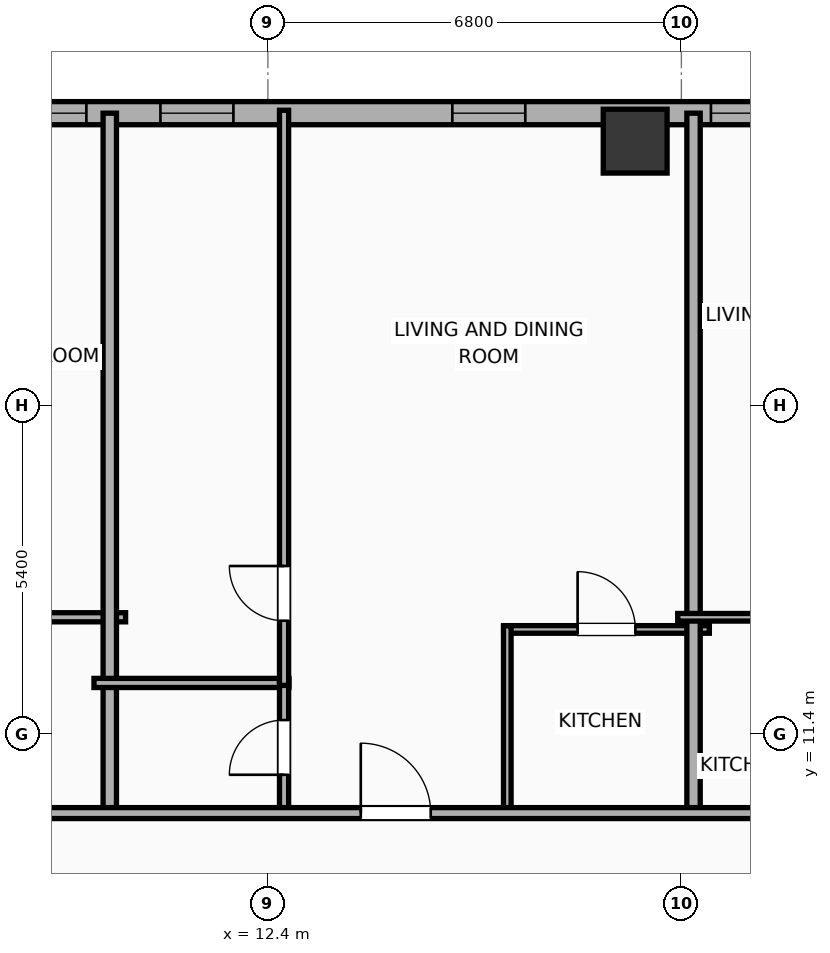
"""IFC4 building model, lengths in metres.
Left out: names, types, materials, properties, quantities, classifications, styles, units other than length and angle.
Written with IfcOpenShell. Run it as: python <this file> out.ifc"""

import sys

from ifc_helpers import new_model, si_unit, direction, frame, frame_2d, origin, origin_2d, place, context, subcontext, project, spatial, rectangle, hollow_rectangle, extrude, element, fill, save


model = new_model("IFC4")
c1 = context("Model", 3, precision=1e-05, world=origin(), true_north=direction((0.0, 1.0)))
c2 = subcontext(c1, "Body", "Model", "MODEL_VIEW")
j1 = project(units=[si_unit("LENGTHUNIT", "METRE"), si_unit("PLANEANGLEUNIT", "RADIAN")], contexts=[c1])
p1 = place(None, origin())
s1 = spatial("IfcSite", under=j1, at=p1, CompositionType="ELEMENT")
p2 = place(p1, origin())
s2 = spatial("IfcBuilding", under=s1, at=p2, CompositionType="ELEMENT")
p3 = place(p2, frame((0.0, 0.0, 105.3)))
s3 = spatial("IfcBuildingStorey", under=s2, at=p3, CompositionType="ELEMENT", Elevation=105.3)
p4 = place(p3, frame((18.44, 21.15, 0.0), z_axis=(0.0, 0.0, 1.0), x_axis=(1.0, 0.0, 0.0)))
e1 = element("IfcColumn", 1, at=p4, inside=s3, PredefinedType="COLUMN", context=c2, shape_type="SweptSolid", body=[
    extrude(hollow_rectangle(XDim=1.05, YDim=1.05, WallThickness=0.036, at=origin_2d()), origin(), (0.0, 0.0, 1.0), 3.9),
])
p5 = place(p3, frame((-25.381, 21.61, 0.0), z_axis=(0.0, 0.0, 1.0), x_axis=(1.0, 0.0, 0.0)))
e2 = element("IfcWall", 2, at=p5, inside=s3, PredefinedType="ELEMENTEDWALL", context=c2, shape_type="SweptSolid", body=[
    extrude(rectangle(XDim=54.763, YDim=0.38, at=frame_2d((27.381, 0.0))), origin(), (0.0, 0.0, 1.0), 3.65),
])
p6 = place(p5, frame((45.067, 0.0, 0.75)))
e3 = element("IfcOpeningElement", 3, at=p6, cuts=e2, PredefinedType="OPENING", context=c2, shape_type="SweptSolid", body=[
    extrude(rectangle(XDim=2.4, YDim=2.1, at=frame_2d((1.2, 1.05))), frame((0.0, 0.2, 0.0), z_axis=(0.0, -1.0, 0.0), x_axis=(1.0, 0.0, 0.0)), (0.0, 0.0, 1.0), 0.4),
])
p7 = place(p5, frame((4.076, 0.0, 0.75)))
e4 = element("IfcOpeningElement", 4, at=p7, cuts=e2, PredefinedType="OPENING", context=c2, shape_type="SweptSolid", body=[
    extrude(rectangle(XDim=1.2, YDim=2.05, at=frame_2d((0.6, 1.025))), frame((0.0, 0.2, 0.0), z_axis=(0.0, -1.0, 0.0), x_axis=(1.0, 0.0, 0.0)), (0.0, 0.0, 1.0), 0.4),
])
p8 = place(p5, frame((9.395, 0.0, 0.75)))
e5 = element("IfcOpeningElement", 5, at=p8, cuts=e2, PredefinedType="OPENING", context=c2, shape_type="SweptSolid", body=[
    extrude(rectangle(XDim=0.85, YDim=2.05, at=frame_2d((0.425, 1.025))), frame((0.0, 0.2, 0.0), z_axis=(0.0, -1.0, 0.0), x_axis=(1.0, 0.0, 0.0)), (0.0, 0.0, 1.0), 0.4),
])
p9 = place(p5, frame((7.205, 0.0, 0.75)))
e6 = element("IfcOpeningElement", 6, at=p9, cuts=e2, PredefinedType="OPENING", context=c2, shape_type="SweptSolid", body=[
    extrude(rectangle(XDim=1.2, YDim=2.05, at=frame_2d((0.6, 1.025))), frame((0.0, 0.2, 0.0), z_axis=(0.0, -1.0, 0.0), x_axis=(1.0, 0.0, 0.0)), (0.0, 0.0, 1.0), 0.4),
])
p10 = place(p5, frame((13.676, 0.0, 0.75)))
e7 = element("IfcOpeningElement", 7, at=p10, cuts=e2, PredefinedType="OPENING", context=c2, shape_type="SweptSolid", body=[
    extrude(rectangle(XDim=1.2, YDim=2.05, at=frame_2d((0.6, 1.025))), frame((0.0, 0.2, 0.0), z_axis=(0.0, -1.0, 0.0), x_axis=(1.0, 0.0, 0.0)), (0.0, 0.0, 1.0), 0.4),
])
p11 = place(p5, frame((17.136, 0.0, 0.75)))
e8 = element("IfcOpeningElement", 8, at=p11, cuts=e2, PredefinedType="OPENING", context=c2, shape_type="SweptSolid", body=[
    extrude(rectangle(XDim=1.2, YDim=2.05, at=frame_2d((0.6, 1.025))), frame((0.0, 0.2, 0.0), z_axis=(0.0, -1.0, 0.0), x_axis=(1.0, 0.0, 0.0)), (0.0, 0.0, 1.0), 0.4),
])
p12 = place(p5, frame((22.656, 0.0, 0.75)))
e9 = element("IfcOpeningElement", 9, at=p12, cuts=e2, PredefinedType="OPENING", context=c2, shape_type="SweptSolid", body=[
    extrude(rectangle(XDim=1.2, YDim=2.05, at=frame_2d((0.6, 1.025))), frame((0.0, 0.2, 0.0), z_axis=(0.0, -1.0, 0.0), x_axis=(1.0, 0.0, 0.0)), (0.0, 0.0, 1.0), 0.4),
])
p13 = place(p5, frame((29.443, 0.0, 0.75)))
e10 = element("IfcOpeningElement", 10, at=p13, cuts=e2, PredefinedType="OPENING", context=c2, shape_type="SweptSolid", body=[
    extrude(rectangle(XDim=1.2, YDim=2.05, at=frame_2d((0.6, 1.025))), frame((0.0, 0.2, 0.0), z_axis=(0.0, -1.0, 0.0), x_axis=(1.0, 0.0, 0.0)), (0.0, 0.0, 1.0), 0.4),
])
p14 = place(p5, frame((26.348, 0.0, 0.75)))
e11 = element("IfcOpeningElement", 11, at=p14, cuts=e2, PredefinedType="OPENING", context=c2, shape_type="SweptSolid", body=[
    extrude(rectangle(XDim=1.2, YDim=2.05, at=frame_2d((0.6, 1.025))), frame((0.0, 0.2, 0.0), z_axis=(0.0, -1.0, 0.0), x_axis=(1.0, 0.0, 0.0)), (0.0, 0.0, 1.0), 0.4),
])
p15 = place(p5, frame((33.596, 0.0, 0.75)))
e12 = element("IfcOpeningElement", 12, at=p15, cuts=e2, PredefinedType="OPENING", context=c2, shape_type="SweptSolid", body=[
    extrude(rectangle(XDim=1.2, YDim=2.05, at=frame_2d((0.6, 1.025))), frame((0.0, 0.2, 0.0), z_axis=(0.0, -1.0, 0.0), x_axis=(1.0, 0.0, 0.0)), (0.0, 0.0, 1.0), 0.4),
])
p16 = place(p5, frame((36.014, 0.0, 0.75)))
e13 = element("IfcOpeningElement", 13, at=p16, cuts=e2, PredefinedType="OPENING", context=c2, shape_type="SweptSolid", body=[
    extrude(rectangle(XDim=1.2, YDim=2.05, at=frame_2d((0.6, 1.025))), frame((0.0, 0.2, 0.0), z_axis=(0.0, -1.0, 0.0), x_axis=(1.0, 0.0, 0.0)), (0.0, 0.0, 1.0), 0.4),
])
p17 = place(p5, frame((40.814, 0.0, 0.75)))
e14 = element("IfcOpeningElement", 14, at=p17, cuts=e2, PredefinedType="OPENING", context=c2, shape_type="SweptSolid", body=[
    extrude(rectangle(XDim=1.2, YDim=2.05, at=frame_2d((0.6, 1.025))), frame((0.0, 0.2, 0.0), z_axis=(0.0, -1.0, 0.0), x_axis=(1.0, 0.0, 0.0)), (0.0, 0.0, 1.0), 0.4),
])
p18 = place(p5, frame((49.385, 0.0, 0.75)))
e15 = element("IfcOpeningElement", 15, at=p18, cuts=e2, PredefinedType="OPENING", context=c2, shape_type="SweptSolid", body=[
    extrude(rectangle(XDim=1.2, YDim=2.05, at=frame_2d((0.6, 1.025))), frame((0.0, 0.2, 0.0), z_axis=(0.0, -1.0, 0.0), x_axis=(1.0, 0.0, 0.0)), (0.0, 0.0, 1.0), 0.4),
])
p19 = place(p5, frame((52.181, 0.0, 0.75)))
e16 = element("IfcOpeningElement", 16, at=p19, cuts=e2, PredefinedType="OPENING", context=c2, shape_type="SweptSolid", body=[
    extrude(rectangle(XDim=1.2, YDim=2.05, at=frame_2d((0.6, 1.025))), frame((0.0, 0.2, 0.0), z_axis=(0.0, -1.0, 0.0), x_axis=(1.0, 0.0, 0.0)), (0.0, 0.0, 1.0), 0.4),
])
p20 = place(p3, frame((6.27, 13.32, 0.0), z_axis=(0.0, 0.0, 1.0), x_axis=(1.0, 0.0, 0.0)))
e17 = element("IfcWall", 17, at=p20, inside=s3, PredefinedType="PLUMBINGWALL", context=c2, shape_type="SweptSolid", body=[
    extrude(rectangle(XDim=3.79, YDim=0.15, at=frame_2d((1.895, 0.0))), origin(), (0.0, 0.0, 1.0), 3.65),
])
p21 = place(p3, frame((9.8, 10.02, 0.0), z_axis=(0.0, 0.0, 1.0), x_axis=(0.0, 1.0, 0.0)))
e18 = element("IfcWall", 18, at=p21, inside=s3, PredefinedType="PARTITIONING", context=c2, shape_type="SweptSolid", body=[
    extrude(rectangle(XDim=11.59, YDim=0.22, at=frame_2d((5.795, 0.0))), origin(), (0.0, 0.0, 1.0), 3.65),
])
p22 = place(p3, frame((9.54, 12.24, 0.0), z_axis=(0.0, 0.0, 1.0), x_axis=(1.0, 0.0, 0.0)))
e19 = element("IfcWall", 19, at=p22, inside=s3, PredefinedType="PLUMBINGWALL", context=c2, shape_type="SweptSolid", body=[
    extrude(rectangle(XDim=3.206, YDim=0.15, at=frame_2d((1.603, 0.0))), origin(), (0.0, 0.0, 1.0), 3.65),
])
p23 = place(p3, frame((12.666, 10.08, 0.0), z_axis=(0.0, 0.0, 1.0), x_axis=(0.0, 1.0, 0.0)))
e20 = element("IfcWall", 20, at=p23, inside=s3, PredefinedType="PLUMBINGWALL", context=c2, shape_type="SweptSolid", body=[
    extrude(rectangle(XDim=2.2, YDim=0.15, at=frame_2d((1.1, 0.0))), origin(), (0.0, 0.0, 1.0), 3.65),
])
p24 = place(p23, frame((0.65, 0.0, 0.0)))
e21 = element("IfcOpeningElement", 21, at=p24, cuts=e20, PredefinedType="OPENING", context=c2, shape_type="SweptSolid", body=[
    extrude(rectangle(XDim=0.9, YDim=2.05, at=frame_2d((0.45, 1.025))), frame((0.0, 0.085, 0.0), z_axis=(0.0, -1.0, 0.0), x_axis=(1.0, 0.0, 0.0)), (0.0, 0.0, 1.0), 0.17),
])
p25 = place(p3, frame((12.666, 12.2, 0.0), z_axis=(0.0, 0.0, 1.0), x_axis=(0.0, 1.0, 0.0)))
e22 = element("IfcWall", 22, at=p25, inside=s3, PredefinedType="PLUMBINGWALL", context=c2, shape_type="SweptSolid", body=[
    extrude(rectangle(XDim=9.458, YDim=0.15, at=frame_2d((4.729, 0.0))), origin(), (0.0, 0.0, 1.0), 3.65),
])
p26 = place(p25, frame((1.063, 0.0, 0.0)))
e23 = element("IfcOpeningElement", 23, at=p26, cuts=e22, PredefinedType="OPENING", context=c2, shape_type="SweptSolid", body=[
    extrude(rectangle(XDim=0.9, YDim=2.05, at=frame_2d((0.45, 1.025))), frame((0.0, 0.085, 0.0), z_axis=(0.0, -1.0, 0.0), x_axis=(1.0, 0.0, 0.0)), (0.0, 0.0, 1.0), 0.17),
])
p27 = place(p3, frame((16.277, 13.12, 0.0), z_axis=(0.0, 0.0, 1.0), x_axis=(1.0, 0.0, 0.0)))
e24 = element("IfcWall", 24, at=p27, inside=s3, PredefinedType="PARTITIONING", context=c2, shape_type="SweptSolid", body=[
    extrude(rectangle(XDim=3.383, YDim=0.125, at=frame_2d((1.691, 0.0))), origin(), (0.0, 0.0, 1.0), 3.65),
])
p28 = place(p27, frame((1.217, 0.0, 0.0)))
e25 = element("IfcOpeningElement", 25, at=p28, cuts=e24, PredefinedType="OPENING", context=c2, shape_type="SweptSolid", body=[
    extrude(rectangle(XDim=0.95, YDim=2.05, at=frame_2d((0.475, 1.025))), frame((0.0, 0.073, 0.0), z_axis=(0.0, -1.0, 0.0), x_axis=(1.0, 0.0, 0.0)), (0.0, 0.0, 1.0), 0.145),
])
p29 = place(p3, frame((16.337, 10.08, 0.0), z_axis=(0.0, 0.0, 1.0), x_axis=(0.0, 1.0, 0.0)))
e26 = element("IfcWall", 26, at=p29, inside=s3, PredefinedType="PARTITIONING", context=c2, shape_type="SweptSolid", body=[
    extrude(rectangle(XDim=3.1, YDim=0.125, at=frame_2d((1.55, 0.0))), origin(), (0.0, 0.0, 1.0), 3.65),
])
p30 = place(p3, frame((19.4, 10.02, 0.0), z_axis=(0.0, 0.0, 1.0), x_axis=(0.0, 1.0, 0.0)))
e27 = element("IfcWall", 27, at=p30, inside=s3, PredefinedType="PARTITIONING", context=c2, shape_type="SweptSolid", body=[
    extrude(rectangle(XDim=11.59, YDim=0.22, at=frame_2d((5.795, 0.0))), origin(), (0.0, 0.0, 1.0), 3.65),
])
p31 = place(p3, frame((19.14, 13.32, 0.0), z_axis=(0.0, 0.0, 1.0), x_axis=(1.0, 0.0, 0.0)))
e28 = element("IfcWall", 28, at=p31, inside=s3, PredefinedType="PARTITIONING", context=c2, shape_type="SweptSolid", body=[
    extrude(rectangle(XDim=2.69, YDim=0.125, at=frame_2d((1.345, 0.0))), origin(), (0.0, 0.0, 1.0), 3.65),
])
p32 = place(p3, frame((-29.21, 10.1, 0.0), z_axis=(0.0, 0.0, 1.0), x_axis=(1.0, 0.0, 0.0)))
e29 = element("IfcWall", 29, at=p32, inside=s3, PredefinedType="PARTITIONING", context=c2, shape_type="SweptSolid", body=[
    extrude(rectangle(XDim=62.42, YDim=0.18, at=frame_2d((31.21, 0.0))), origin(), (0.0, 0.0, 1.0), 3.65),
])
p33 = place(p32, frame((4.906, 0.0, 0.0)))
e30 = element("IfcOpeningElement", 30, at=p33, cuts=e29, PredefinedType="OPENING", context=c2, shape_type="SweptSolid", body=[
    extrude(rectangle(XDim=1.15, YDim=2.05, at=frame_2d((0.575, 1.025))), frame((0.0, 0.1, 0.0), z_axis=(0.0, -1.0, 0.0), x_axis=(1.0, 0.0, 0.0)), (0.0, 0.0, 1.0), 0.2),
])
p34 = place(p32, frame((14.812, 0.0, 0.0)))
e31 = element("IfcOpeningElement", 31, at=p34, cuts=e29, PredefinedType="OPENING", context=c2, shape_type="SweptSolid", body=[
    extrude(rectangle(XDim=1.15, YDim=2.05, at=frame_2d((0.575, 1.025))), frame((0.0, 0.1, 0.0), z_axis=(0.0, -1.0, 0.0), x_axis=(1.0, 0.0, 0.0)), (0.0, 0.0, 1.0), 0.2),
])
p35 = place(p32, frame((24.406, 0.0, 0.0)))
e32 = element("IfcOpeningElement", 32, at=p35, cuts=e29, PredefinedType="OPENING", context=c2, shape_type="SweptSolid", body=[
    extrude(rectangle(XDim=1.15, YDim=2.05, at=frame_2d((0.575, 1.025))), frame((0.0, 0.1, 0.0), z_axis=(0.0, -1.0, 0.0), x_axis=(1.0, 0.0, 0.0)), (0.0, 0.0, 1.0), 0.2),
])
p36 = place(p32, frame((33.981, 0.0, 0.0)))
e33 = element("IfcOpeningElement", 33, at=p36, cuts=e29, PredefinedType="OPENING", context=c2, shape_type="SweptSolid", body=[
    extrude(rectangle(XDim=1.15, YDim=2.05, at=frame_2d((0.575, 1.025))), frame((0.0, 0.1, 0.0), z_axis=(0.0, -1.0, 0.0), x_axis=(1.0, 0.0, 0.0)), (0.0, 0.0, 1.0), 0.2),
])
p37 = place(p32, frame((43.138, 0.0, 0.0)))
e34 = element("IfcOpeningElement", 34, at=p37, cuts=e29, PredefinedType="OPENING", context=c2, shape_type="SweptSolid", body=[
    extrude(rectangle(XDim=1.15, YDim=2.05, at=frame_2d((0.575, 1.025))), frame((0.0, 0.1, 0.0), z_axis=(0.0, -1.0, 0.0), x_axis=(1.0, 0.0, 0.0)), (0.0, 0.0, 1.0), 0.2),
])
p38 = place(p32, frame((51.777, 0.0, 0.0)))
e35 = element("IfcOpeningElement", 35, at=p38, cuts=e29, PredefinedType="OPENING", context=c2, shape_type="SweptSolid", body=[
    extrude(rectangle(XDim=0.9, YDim=2.05, at=frame_2d((0.45, 1.025))), frame((0.0, 0.1, 0.0), z_axis=(0.0, -1.0, 0.0), x_axis=(1.0, 0.0, 0.0)), (0.0, 0.0, 1.0), 0.2),
])
p39 = place(p32, frame((58.718, 0.0, 0.0)))
e36 = element("IfcOpeningElement", 36, at=p39, cuts=e29, PredefinedType="OPENING", context=c2, shape_type="SweptSolid", body=[
    extrude(rectangle(XDim=0.9, YDim=2.05, at=frame_2d((0.45, 1.025))), frame((0.0, 0.1, 0.0), z_axis=(0.0, -1.0, 0.0), x_axis=(1.0, 0.0, 0.0)), (0.0, 0.0, 1.0), 0.2),
])
p40 = place(p6, origin())
e37 = element("IfcWindow", 37, at=p40, inside=s3, PartitioningType="SINGLE_PANEL", PredefinedType="WINDOW", context=c2, shape_type="SweptSolid", body=[
    extrude(rectangle(XDim=2.4, YDim=2.1, at=frame_2d((1.2, 1.05))), frame((0.0, 0.03, 0.0), z_axis=(0.0, -1.0, 0.0), x_axis=(1.0, 0.0, 0.0)), (0.0, 0.0, 1.0), 0.06),
])
fill(e3, e37)
p41 = place(p15, origin())
e38 = element("IfcWindow", 38, at=p41, inside=s3, PartitioningType="SINGLE_PANEL", PredefinedType="WINDOW", context=c2, shape_type="SweptSolid", body=[
    extrude(rectangle(XDim=1.2, YDim=2.05, at=frame_2d((0.6, 1.025))), frame((0.0, 0.03, 0.0), z_axis=(0.0, -1.0, 0.0), x_axis=(1.0, 0.0, 0.0)), (0.0, 0.0, 1.0), 0.06),
])
fill(e12, e38)
p42 = place(p16, origin())
e39 = element("IfcWindow", 39, at=p42, inside=s3, PartitioningType="SINGLE_PANEL", PredefinedType="WINDOW", context=c2, shape_type="SweptSolid", body=[
    extrude(rectangle(XDim=1.2, YDim=2.05, at=frame_2d((0.6, 1.025))), frame((0.0, 0.03, 0.0), z_axis=(0.0, -1.0, 0.0), x_axis=(1.0, 0.0, 0.0)), (0.0, 0.0, 1.0), 0.06),
])
fill(e13, e39)
p43 = place(p17, origin())
e40 = element("IfcWindow", 40, at=p43, inside=s3, PartitioningType="SINGLE_PANEL", PredefinedType="WINDOW", context=c2, shape_type="SweptSolid", body=[
    extrude(rectangle(XDim=1.2, YDim=2.05, at=frame_2d((0.6, 1.025))), frame((0.0, 0.03, 0.0), z_axis=(0.0, -1.0, 0.0), x_axis=(1.0, 0.0, 0.0)), (0.0, 0.0, 1.0), 0.06),
])
fill(e14, e40)
p44 = place(p24, origin())
e41 = element("IfcDoor", 41, at=p44, inside=s3, OperationType="SINGLE_SWING_LEFT", PredefinedType="DOOR", context=c2, shape_type="SweptSolid", body=[
    extrude(rectangle(XDim=0.9, YDim=2.05, at=frame_2d((0.45, 1.025))), frame((0.0, 0.025, 0.0), z_axis=(0.0, -1.0, 0.0), x_axis=(1.0, 0.0, 0.0)), (0.0, 0.0, 1.0), 0.05),
])
fill(e21, e41)
p45 = place(p26, origin())
e42 = element("IfcDoor", 42, at=p45, inside=s3, OperationType="SINGLE_SWING_RIGHT", PredefinedType="DOOR", context=c2, shape_type="SweptSolid", body=[
    extrude(rectangle(XDim=0.9, YDim=2.05, at=frame_2d((0.45, 1.025))), frame((0.0, 0.025, 0.0), z_axis=(0.0, -1.0, 0.0), x_axis=(1.0, 0.0, 0.0)), (0.0, 0.0, 1.0), 0.05),
])
fill(e23, e42)
p46 = place(p28, origin())
e43 = element("IfcDoor", 43, at=p46, inside=s3, OperationType="SINGLE_SWING_LEFT", PredefinedType="DOOR", context=c2, shape_type="SweptSolid", body=[
    extrude(rectangle(XDim=0.95, YDim=2.05, at=frame_2d((0.475, 1.025))), frame((0.0, 0.025, 0.0), z_axis=(0.0, -1.0, 0.0), x_axis=(1.0, 0.0, 0.0)), (0.0, 0.0, 1.0), 0.05),
])
fill(e25, e43)
p47 = place(p37, origin())
e44 = element("IfcDoor", 44, at=p47, inside=s3, OperationType="SINGLE_SWING_LEFT", PredefinedType="DOOR", context=c2, shape_type="SweptSolid", body=[
    extrude(rectangle(XDim=1.15, YDim=2.05, at=frame_2d((0.575, 1.025))), frame((0.0, 0.025, 0.0), z_axis=(0.0, -1.0, 0.0), x_axis=(1.0, 0.0, 0.0)), (0.0, 0.0, 1.0), 0.05),
])
fill(e34, e44)
save(model, sys.argv[1])
